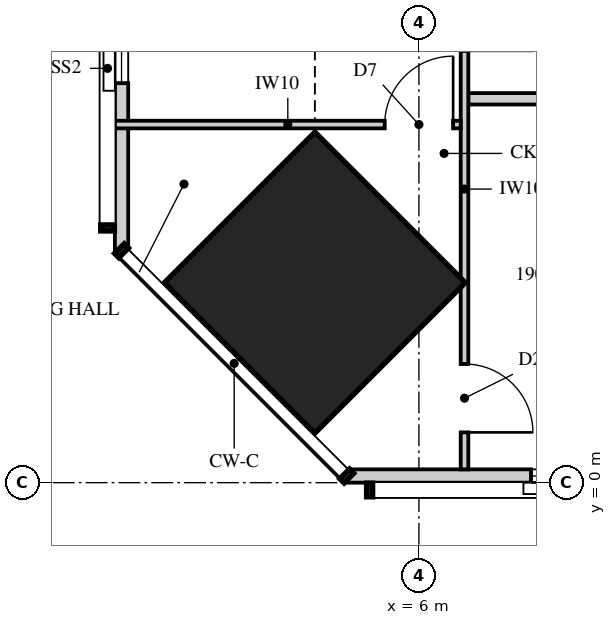
"""IFC4 building model, lengths in metres.
Left out: names, types, materials, properties, quantities, classifications, styles, units other than length and angle.
Written with IfcOpenShell. Run it as: python <this file> out.ifc"""

import sys

from ifc_helpers import new_model, si_unit, direction, frame, frame_2d, origin, origin_2d, place, context, subcontext, project, spatial, polyline, rectangle, hollow_rectangle, outline, extrude, element, fill, save


model = new_model("IFC4")
c1 = context("Model", 3, precision=1e-05, world=origin(), true_north=direction((0.0, 1.0)))
c2 = subcontext(c1, "Body", "Model", "MODEL_VIEW")
j1 = project(units=[si_unit("LENGTHUNIT", "METRE"), si_unit("PLANEANGLEUNIT", "RADIAN")], contexts=[c1])
p1 = place(None, origin())
s1 = spatial("IfcSite", under=j1, at=p1, CompositionType="ELEMENT")
p2 = place(p1, origin())
s2 = spatial("IfcBuilding", under=s1, at=p2, CompositionType="ELEMENT")
p3 = place(p2, frame((0.0, 0.0, 71.25)))
s3 = spatial("IfcBuildingStorey", under=s2, at=p3, CompositionType="ELEMENT", Elevation=71.25)
p4 = place(p3, frame((4.631, 2.631, 0.0), z_axis=(0.0, 0.0, 1.0), x_axis=(0.707106781187, 0.707106781187, 0.0)))
e1 = element("IfcColumn", 1, at=p4, inside=s3, PredefinedType="COLUMN", context=c2, shape_type="SweptSolid", body=[
    extrude(hollow_rectangle(XDim=2.8, YDim=2.8, WallThickness=0.175, at=origin_2d()), origin(), (0.0, 0.0, 1.0), 3.5),
])
p5 = place(p3, frame((5.051, 0.087, 0.0), z_axis=(0.0, 0.0, 1.0), x_axis=(1.0, 0.0, 0.0)))
e2 = element("IfcWall", 2, at=p5, inside=s3, PredefinedType="SOLIDWALL", context=c2, shape_type="SweptSolid", body=[
    extrude(rectangle(XDim=12.424, YDim=0.175, at=frame_2d((6.212, 0.0))), origin(), (0.0, 0.0, 1.0), 3.22),
])
p6 = place(p5, frame((2.424, 0.0, 0.4)))
e3 = element("IfcOpeningElement", 3, at=p6, cuts=e2, PredefinedType="OPENING", context=c2, shape_type="SweptSolid", body=[
    extrude(rectangle(XDim=1.8, YDim=1.85, at=frame_2d((0.9, 0.925))), frame((0.0, 0.097, 0.0), z_axis=(0.0, -1.0, 0.0), x_axis=(1.0, 0.0, 0.0)), (0.0, 0.0, 1.0), 0.195),
])
p7 = place(p5, frame((10.799, 0.0, 0.4)))
e4 = element("IfcOpeningElement", 4, at=p7, cuts=e2, PredefinedType="OPENING", context=c2, shape_type="SweptSolid", body=[
    extrude(rectangle(XDim=1.2, YDim=1.85, at=frame_2d((0.6, 0.925))), frame((0.0, 0.097, 0.0), z_axis=(0.0, -1.0, 0.0), x_axis=(1.0, 0.0, 0.0)), (0.0, 0.0, 1.0), 0.195),
])
p8 = place(p3, frame((2.087, 19.15, 0.0), z_axis=(0.0, 0.0, 1.0), x_axis=(0.0, -1.0, 0.0)))
e5 = element("IfcWall", 5, at=p8, inside=s3, PredefinedType="SOLIDWALL", context=c2, shape_type="SweptSolid", body=[
    extrude(rectangle(XDim=16.099, YDim=0.175, at=frame_2d((8.049, 0.0))), origin(), (0.0, 0.0, 1.0), 3.22),
])
p9 = place(p8, frame((1.488, 0.0, 0.4)))
e6 = element("IfcOpeningElement", 6, at=p9, cuts=e5, PredefinedType="OPENING", context=c2, shape_type="SweptSolid", body=[
    extrude(rectangle(XDim=1.8, YDim=1.85, at=frame_2d((0.9, 0.925))), frame((0.0, 0.097, 0.0), z_axis=(0.0, -1.0, 0.0), x_axis=(1.0, 0.0, 0.0)), (0.0, 0.0, 1.0), 0.195),
])
p10 = place(p8, frame((9.106, 0.0, 0.4)))
e7 = element("IfcOpeningElement", 7, at=p10, cuts=e5, PredefinedType="OPENING", context=c2, shape_type="SweptSolid", body=[
    extrude(rectangle(XDim=1.2, YDim=1.85, at=frame_2d((0.6, 0.925))), frame((0.0, 0.097, 0.0), z_axis=(0.0, -1.0, 0.0), x_axis=(1.0, 0.0, 0.0)), (0.0, 0.0, 1.0), 0.195),
])
p11 = place(p8, frame((12.094, 0.0, 0.4)))
e8 = element("IfcOpeningElement", 8, at=p11, cuts=e5, PredefinedType="OPENING", context=c2, shape_type="SweptSolid", body=[
    extrude(rectangle(XDim=1.8, YDim=1.85, at=frame_2d((0.9, 0.925))), frame((0.0, 0.097, 0.0), z_axis=(0.0, -1.0, 0.0), x_axis=(1.0, 0.0, 0.0)), (0.0, 0.0, 1.0), 0.195),
])
p12 = place(p3, frame((6.6, 0.175, 0.0), z_axis=(0.0, 0.0, 1.0), x_axis=(0.0, 1.0, 0.0)))
e9 = element("IfcWall", 9, at=p12, inside=s3, PredefinedType="PARTITIONING", context=c2, shape_type="SweptSolid", body=[
    extrude(outline(polyline([(0.0, 0.0), (7.375, 0.0), (7.375, 3.22), (2.863, 3.22), (2.863, 2.848), (2.785, 2.854), (2.785, 2.1), (1.337, 2.1), (1.337, 3.22), (0.0, 3.22), (0.0, 0.0)])), frame((0.0, 0.05, 0.0), z_axis=(0.0, -1.0, 0.0), x_axis=(1.0, 0.0, 0.0)), (0.0, 0.0, 1.0), 0.1),
])
p13 = place(p12, frame((0.486, 0.0, 0.0)))
e10 = element("IfcOpeningElement", 10, at=p13, cuts=e9, PredefinedType="OPENING", context=c2, shape_type="SweptSolid", body=[
    extrude(rectangle(XDim=0.9, YDim=2.1, at=frame_2d((0.45, 1.05))), frame((0.0, 0.06, 0.0), z_axis=(0.0, -1.0, 0.0), x_axis=(1.0, 0.0, 0.0)), (0.0, 0.0, 1.0), 0.12),
])
p14 = place(p12, frame((5.506, 0.0, 0.0)))
e11 = element("IfcOpeningElement", 11, at=p14, cuts=e9, PredefinedType="OPENING", context=c2, shape_type="SweptSolid", body=[
    extrude(rectangle(XDim=0.9, YDim=2.1, at=frame_2d((0.45, 1.05))), frame((0.0, 0.06, 0.0), z_axis=(0.0, -1.0, 0.0), x_axis=(1.0, 0.0, 0.0)), (0.0, 0.0, 1.0), 0.12),
])
p15 = place(p3, frame((2.0, 4.711, 0.0), z_axis=(0.0, 0.0, 1.0), x_axis=(1.0, 0.0, 0.0)))
e12 = element("IfcWall", 12, at=p15, inside=s3, PredefinedType="PARTITIONING", context=c2, shape_type="SweptSolid", body=[
    extrude(outline(polyline([(0.0, 0.0), (4.55, 0.0), (4.55, 3.22), (3.407, 3.22), (3.407, 3.01), (3.404, 2.955), (3.011, 2.949), (3.011, 2.1), (1.577, 2.1), (1.577, 3.22), (0.0, 3.22), (0.0, 0.0)])), frame((0.0, 0.05, 0.0), z_axis=(0.0, -1.0, 0.0), x_axis=(1.0, 0.0, 0.0)), (0.0, 0.0, 1.0), 0.1),
])
p16 = place(p15, frame((3.55, 0.0, 0.0)))
e13 = element("IfcOpeningElement", 13, at=p16, cuts=e12, PredefinedType="OPENING", context=c2, shape_type="SweptSolid", body=[
    extrude(rectangle(XDim=0.9, YDim=2.1, at=frame_2d((0.45, 1.05))), frame((0.0, 0.06, 0.0), z_axis=(0.0, -1.0, 0.0), x_axis=(1.0, 0.0, 0.0)), (0.0, 0.0, 1.0), 0.12),
])
p17 = place(p3, frame((6.65, 5.05, 0.0), z_axis=(0.0, 0.0, 1.0), x_axis=(1.0, 0.0, 0.0)))
e14 = element("IfcWall", 14, at=p17, inside=s3, PredefinedType="PLUMBINGWALL", context=c2, shape_type="SweptSolid", body=[
    extrude(outline(polyline([(0.0, 0.0), (3.45, 0.0), (3.45, 3.22), (3.45, 2.62), (2.265, 2.62), (2.265, 3.22), (0.0, 3.22), (0.0, 0.0)])), frame((0.0, 0.075, 0.0), z_axis=(0.0, -1.0, 0.0), x_axis=(1.0, 0.0, 0.0)), (0.0, 0.0, 1.0), 0.15),
])
p18 = place(p17, frame((2.15, 0.0, 0.0)))
e15 = element("IfcOpeningElement", 15, at=p18, cuts=e14, PredefinedType="OPENING", context=c2, shape_type="SweptSolid", body=[
    extrude(rectangle(XDim=0.9, YDim=2.1, at=frame_2d((0.45, 1.05))), frame((0.0, 0.085, 0.0), z_axis=(0.0, -1.0, 0.0), x_axis=(1.0, 0.0, 0.0)), (0.0, 0.0, 1.0), 0.17),
])
p19 = place(p6, origin())
e16 = element("IfcWindow", 16, at=p19, inside=s3, PartitioningType="SINGLE_PANEL", PredefinedType="WINDOW", context=c2, shape_type="SweptSolid", body=[
    extrude(rectangle(XDim=1.8, YDim=1.85, at=frame_2d((0.9, 0.925))), frame((0.0, 0.03, 0.0), z_axis=(0.0, -1.0, 0.0), x_axis=(1.0, 0.0, 0.0)), (0.0, 0.0, 1.0), 0.06),
])
fill(e3, e16)
p20 = place(p11, origin())
e17 = element("IfcWindow", 17, at=p20, inside=s3, PartitioningType="SINGLE_PANEL", PredefinedType="WINDOW", context=c2, shape_type="SweptSolid", body=[
    extrude(rectangle(XDim=1.8, YDim=1.85, at=frame_2d((0.9, 0.925))), frame((0.0, 0.03, 0.0), z_axis=(0.0, -1.0, 0.0), x_axis=(1.0, 0.0, 0.0)), (0.0, 0.0, 1.0), 0.06),
])
fill(e8, e17)
p21 = place(p16, origin())
e18 = element("IfcDoor", 18, at=p21, inside=s3, OperationType="SINGLE_SWING_RIGHT", PredefinedType="DOOR", context=c2, shape_type="SweptSolid", body=[
    extrude(rectangle(XDim=0.9, YDim=2.1, at=frame_2d((0.45, 1.05))), frame((0.0, 0.025, 0.0), z_axis=(0.0, -1.0, 0.0), x_axis=(1.0, 0.0, 0.0)), (0.0, 0.0, 1.0), 0.05),
])
fill(e13, e18)
p22 = place(p13, frame((0.9, 0.0, 0.0), z_axis=(0.0, 0.0, 1.0), x_axis=(-1.0, 0.0, 0.0)))
e19 = element("IfcDoor", 19, at=p22, inside=s3, OperationType="SINGLE_SWING_RIGHT", PredefinedType="DOOR", context=c2, shape_type="SweptSolid", body=[
    extrude(rectangle(XDim=0.9, YDim=2.1, at=frame_2d((0.45, 1.05))), frame((0.0, 0.025, 0.0), z_axis=(0.0, -1.0, 0.0), x_axis=(1.0, 0.0, 0.0)), (0.0, 0.0, 1.0), 0.05),
])
fill(e10, e19)
save(model, sys.argv[1])
